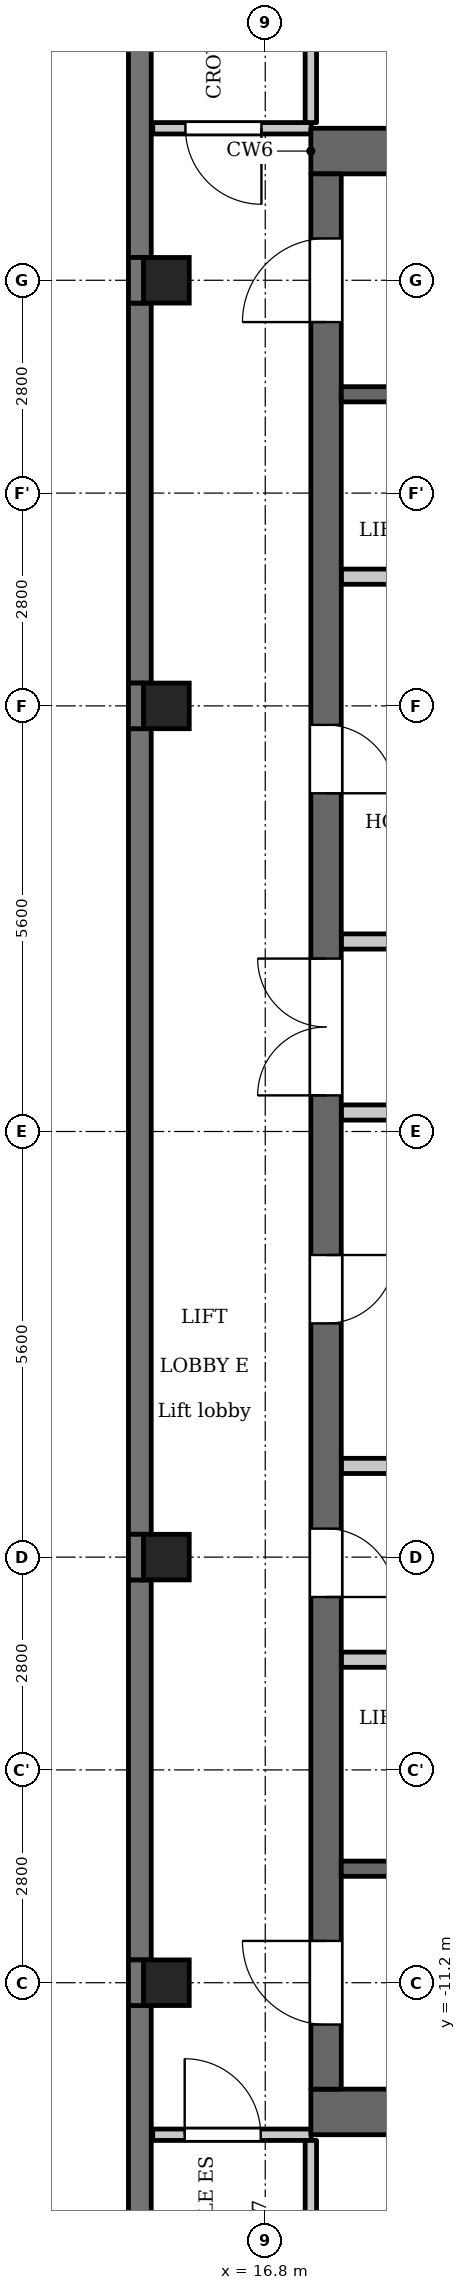
"""IFC4 building model, lengths in metres.
Left out: names, types, materials, properties, quantities, classifications, styles, units other than length and angle.
Written with IfcOpenShell. Run it as: python <this file> out.ifc"""

import sys

from ifc_helpers import new_model, si_unit, direction, frame, frame_2d, origin, origin_2d, place, context, subcontext, project, spatial, polyline, rectangle, outline, extrude, element, fill, save


model = new_model("IFC4")
c1 = context("Model", 3, precision=1e-05, world=origin(), true_north=direction((0.0, 1.0)))
c2 = subcontext(c1, "Body", "Model", "MODEL_VIEW")
j1 = project(units=[si_unit("LENGTHUNIT", "METRE"), si_unit("PLANEANGLEUNIT", "RADIAN")], contexts=[c1])
p1 = place(None, origin())
s1 = spatial("IfcSite", under=j1, at=p1, CompositionType="ELEMENT")
p2 = place(p1, origin())
s2 = spatial("IfcBuilding", under=s1, at=p2, CompositionType="ELEMENT")
p3 = place(p2, frame((0.0, 0.0, 310.4)))
s3 = spatial("IfcBuildingStorey", under=s2, at=p3, CompositionType="ELEMENT", Elevation=310.4)
for number, where, z_axis, x_axis in (
    (1, (15.5, -11.2, 0.0), (0.0, 0.0, 1.0), (1.0, 0.0, 0.0)),
    (2, (15.5, -5.6, 0.0), (0.0, 0.0, 1.0), (1.0, 0.0, 0.0)),
    (3, (15.5, 5.6, 0.0), (0.0, 0.0, 1.0), (1.0, 0.0, 0.0)),
    (4, (15.5, 11.2, 0.0), (0.0, 0.0, 1.0), (1.0, 0.0, 0.0)),
):
    element("IfcColumn", number, at=place(p3, frame(where, z_axis=z_axis, x_axis=x_axis)), inside=s3, PredefinedType="COLUMN", context=c2, shape_type="SweptSolid", body=[
        extrude(rectangle(XDim=0.6, YDim=0.6, at=origin_2d()), origin(), (0.0, 0.0, 1.0), 3.5),
    ])
p4 = place(p3, frame((15.15, 18.8, 0.0), z_axis=(0.0, 0.0, 1.0), x_axis=(0.0, -1.0, 0.0)))
e5 = element("IfcWall", 5, at=p4, inside=s3, PredefinedType="SOLIDWALL", context=c2, shape_type="SweptSolid", body=[
    extrude(rectangle(XDim=7.3, YDim=0.3, at=frame_2d((3.65, 0.0))), origin(), (0.0, 0.0, 1.0), 2.8),
])
p5 = place(p4, frame((1.462, 0.0, 0.9)))
e6 = element("IfcOpeningElement", 6, at=p5, cuts=e5, PredefinedType="OPENING", context=c2, shape_type="SweptSolid", body=[
    extrude(rectangle(XDim=2.6, YDim=1.25, at=frame_2d((1.3, 0.625))), frame((0.0, 0.16, 0.0), z_axis=(0.0, -1.0, 0.0), x_axis=(1.0, 0.0, 0.0)), (0.0, 0.0, 1.0), 0.32),
])
p6 = place(p3, frame((15.15, 10.9, 0.0), z_axis=(0.0, 0.0, 1.0), x_axis=(0.0, -1.0, 0.0)))
e7 = element("IfcWall", 7, at=p6, inside=s3, PredefinedType="SOLIDWALL", context=c2, shape_type="SweptSolid", body=[
    extrude(rectangle(XDim=5.0, YDim=0.3, at=frame_2d((2.5, 0.0))), origin(), (0.0, 0.0, 1.0), 2.8),
])
p7 = place(p3, frame((15.15, 5.3, 0.0), z_axis=(0.0, 0.0, 1.0), x_axis=(0.0, -1.0, 0.0)))
e8 = element("IfcWall", 8, at=p7, inside=s3, PredefinedType="SOLIDWALL", context=c2, shape_type="SweptSolid", body=[
    extrude(rectangle(XDim=10.6, YDim=0.3, at=frame_2d((5.3, 0.0))), origin(), (0.0, 0.0, 1.0), 2.8),
])
p8 = place(p3, frame((15.15, -5.9, 0.0), z_axis=(0.0, 0.0, 1.0), x_axis=(0.0, -1.0, 0.0)))
e9 = element("IfcWall", 9, at=p8, inside=s3, PredefinedType="SOLIDWALL", context=c2, shape_type="SweptSolid", body=[
    extrude(rectangle(XDim=5.0, YDim=0.3, at=frame_2d((2.5, 0.0))), origin(), (0.0, 0.0, 1.0), 2.8),
])
p9 = place(p3, frame((15.15, -11.5, 0.0), z_axis=(0.0, 0.0, 1.0), x_axis=(0.0, -1.0, 0.0)))
e10 = element("IfcWall", 10, at=p9, inside=s3, PredefinedType="SOLIDWALL", context=c2, shape_type="SweptSolid", body=[
    extrude(rectangle(XDim=7.3, YDim=0.3, at=frame_2d((3.65, 0.0))), origin(), (0.0, 0.0, 1.0), 2.8),
])
p10 = place(p9, frame((3.637, 0.0, 0.9)))
e11 = element("IfcOpeningElement", 11, at=p10, cuts=e10, PredefinedType="OPENING", context=c2, shape_type="SweptSolid", body=[
    extrude(rectangle(XDim=1.8, YDim=1.25, at=frame_2d((0.9, 0.625))), frame((0.0, 0.16, 0.0), z_axis=(0.0, -1.0, 0.0), x_axis=(1.0, 0.0, 0.0)), (0.0, 0.0, 1.0), 0.32),
])
for number, where, z_axis, x_axis in (
    (12, (17.4, 12.9, 0.0), (0.0, 0.0, 1.0), (1.0, 0.0, 0.0)),
    (13, (17.4, -12.9, 0.0), (0.0, 0.0, 1.0), (1.0, 0.0, 0.0)),
):
    element("IfcWall", number, at=place(p3, frame(where, z_axis=z_axis, x_axis=x_axis)), inside=s3, PredefinedType="SHEAR", context=c2, shape_type="SweptSolid", body=[
        extrude(rectangle(XDim=7.6, YDim=0.6, at=frame_2d((3.8, 0.0))), origin(), (0.0, 0.0, 1.0), 2.8),
    ])
p11 = place(p3, frame((17.8, -4.4, 0.0), z_axis=(0.0, 0.0, 1.0), x_axis=(1.0, 0.0, 0.0)))
e14 = element("IfcWall", 14, at=p11, inside=s3, PredefinedType="PARTITIONING", context=c2, shape_type="SweptSolid", body=[
    extrude(rectangle(XDim=2.8, YDim=0.2, at=frame_2d((1.4, 0.0))), origin(), (0.0, 0.0, 1.0), 2.8),
])
p12 = place(p3, frame((17.6, -12.6, 0.0), z_axis=(0.0, 0.0, 1.0), x_axis=(0.0, 1.0, 0.0)))
e15 = element("IfcWall", 15, at=p12, inside=s3, PredefinedType="SHEAR", context=c2, shape_type="SweptSolid", body=[
    extrude(rectangle(XDim=25.2, YDim=0.4, at=frame_2d((12.6, 0.0))), origin(), (0.0, 0.0, 1.0), 2.8),
])
p13 = place(p12, frame((6.475, 0.0, 0.0)))
e16 = element("IfcOpeningElement", 16, at=p13, cuts=e15, PredefinedType="OPENING", context=c2, shape_type="SweptSolid", body=[
    extrude(rectangle(XDim=0.9, YDim=2.1, at=frame_2d((0.45, 1.05))), frame((0.0, 0.21, 0.0), z_axis=(0.0, -1.0, 0.0), x_axis=(1.0, 0.0, 0.0)), (0.0, 0.0, 1.0), 0.42),
])
p14 = place(p12, frame((10.075, 0.0, 0.0)))
e17 = element("IfcOpeningElement", 17, at=p14, cuts=e15, PredefinedType="OPENING", context=c2, shape_type="SweptSolid", body=[
    extrude(rectangle(XDim=0.9, YDim=2.1, at=frame_2d((0.45, 1.05))), frame((0.0, 0.21, 0.0), z_axis=(0.0, -1.0, 0.0), x_axis=(1.0, 0.0, 0.0)), (0.0, 0.0, 1.0), 0.42),
])
p15 = place(p12, frame((17.05, 0.0, 0.0)))
e18 = element("IfcOpeningElement", 18, at=p15, cuts=e15, PredefinedType="OPENING", context=c2, shape_type="SweptSolid", body=[
    extrude(rectangle(XDim=0.9, YDim=2.1, at=frame_2d((0.45, 1.05))), frame((0.0, 0.21, 0.0), z_axis=(0.0, -1.0, 0.0), x_axis=(1.0, 0.0, 0.0)), (0.0, 0.0, 1.0), 0.42),
])
p16 = place(p12, frame((23.25, 0.0, 0.0)))
e19 = element("IfcOpeningElement", 19, at=p16, cuts=e15, PredefinedType="OPENING", context=c2, shape_type="SweptSolid", body=[
    extrude(rectangle(XDim=1.1, YDim=2.1, at=frame_2d((0.55, 1.05))), frame((0.0, 0.21, 0.0), z_axis=(0.0, -1.0, 0.0), x_axis=(1.0, 0.0, 0.0)), (0.0, 0.0, 1.0), 0.42),
])
p17 = place(p12, frame((0.85, 0.0, 0.0)))
e20 = element("IfcOpeningElement", 20, at=p17, cuts=e15, PredefinedType="OPENING", context=c2, shape_type="SweptSolid", body=[
    extrude(rectangle(XDim=1.1, YDim=2.1, at=frame_2d((0.55, 1.05))), frame((0.0, 0.21, 0.0), z_axis=(0.0, -1.0, 0.0), x_axis=(1.0, 0.0, 0.0)), (0.0, 0.0, 1.0), 0.42),
])
p18 = place(p12, frame((13.075, 0.0, 0.0)))
e21 = element("IfcOpeningElement", 21, at=p18, cuts=e15, PredefinedType="OPENING", context=c2, shape_type="SweptSolid", body=[
    extrude(rectangle(XDim=1.8, YDim=2.1, at=frame_2d((0.9, 1.05))), frame((0.0, 0.21, 0.0), z_axis=(0.0, -1.0, 0.0), x_axis=(1.0, 0.0, 0.0)), (0.0, 0.0, 1.0), 0.42),
])
p19 = place(p3, frame((17.8, -9.7, 0.0), z_axis=(0.0, 0.0, 1.0), x_axis=(1.0, 0.0, 0.0)))
e22 = element("IfcWall", 22, at=p19, inside=s3, PredefinedType="SHEAR", context=c2, shape_type="SweptSolid", body=[
    extrude(rectangle(XDim=5.8, YDim=0.2, at=frame_2d((2.9, 0.0))), origin(), (0.0, 0.0, 1.0), 2.8),
])
p20 = place(p19, frame((0.85, 0.0, 0.0)))
e23 = element("IfcOpeningElement", 23, at=p20, cuts=e22, PredefinedType="OPENING", context=c2, shape_type="SweptSolid", body=[
    extrude(rectangle(XDim=1.1, YDim=2.1, at=frame_2d((0.55, 1.05))), frame((0.0, 0.11, 0.0), z_axis=(0.0, -1.0, 0.0), x_axis=(1.0, 0.0, 0.0)), (0.0, 0.0, 1.0), 0.22),
])
p21 = place(p19, frame((3.75, 0.0, 0.0)))
e24 = element("IfcOpeningElement", 24, at=p21, cuts=e22, PredefinedType="OPENING", context=c2, shape_type="SweptSolid", body=[
    extrude(rectangle(XDim=1.1, YDim=2.1, at=frame_2d((0.55, 1.05))), frame((0.0, 0.11, 0.0), z_axis=(0.0, -1.0, 0.0), x_axis=(1.0, 0.0, 0.0)), (0.0, 0.0, 1.0), 0.22),
])
p22 = place(p3, frame((17.8, -6.95, 0.0), z_axis=(0.0, 0.0, 1.0), x_axis=(1.0, 0.0, 0.0)))
e25 = element("IfcWall", 25, at=p22, inside=s3, PredefinedType="PARTITIONING", context=c2, shape_type="SweptSolid", body=[
    extrude(rectangle(XDim=2.8, YDim=0.2, at=frame_2d((1.4, 0.0))), origin(), (0.0, 0.0, 1.0), 2.8),
])
for number, where, z_axis, x_axis in (
    (26, (17.8, 0.25, 0.0), (0.0, 0.0, 1.0), (1.0, 0.0, 0.0)),
    (27, (17.8, 2.5, 0.0), (0.0, 0.0, 1.0), (1.0, 0.0, 0.0)),
):
    element("IfcWall", number, at=place(p3, frame(where, z_axis=z_axis, x_axis=x_axis)), inside=s3, PredefinedType="PARTITIONING", context=c2, shape_type="SweptSolid", body=[
        extrude(rectangle(XDim=3.0, YDim=0.2, at=frame_2d((1.5, 0.0))), origin(), (0.0, 0.0, 1.0), 2.8),
    ])
p23 = place(p3, frame((17.8, 7.3, 0.0), z_axis=(0.0, 0.0, 1.0), x_axis=(1.0, 0.0, 0.0)))
e28 = element("IfcWall", 28, at=p23, inside=s3, PredefinedType="PARTITIONING", context=c2, shape_type="SweptSolid", body=[
    extrude(rectangle(XDim=2.8, YDim=0.2, at=frame_2d((1.4, 0.0))), origin(), (0.0, 0.0, 1.0), 2.8),
])
p24 = place(p3, frame((17.8, 9.7, 0.0), z_axis=(0.0, 0.0, 1.0), x_axis=(1.0, 0.0, 0.0)))
e29 = element("IfcWall", 29, at=p24, inside=s3, PredefinedType="SHEAR", context=c2, shape_type="SweptSolid", body=[
    extrude(rectangle(XDim=5.8, YDim=0.2, at=frame_2d((2.9, 0.0))), origin(), (0.0, 0.0, 1.0), 2.8),
])
p25 = place(p24, frame((0.85, 0.0, 0.0)))
e30 = element("IfcOpeningElement", 30, at=p25, cuts=e29, PredefinedType="OPENING", context=c2, shape_type="SweptSolid", body=[
    extrude(rectangle(XDim=1.1, YDim=2.1, at=frame_2d((0.55, 1.05))), frame((0.0, 0.11, 0.0), z_axis=(0.0, -1.0, 0.0), x_axis=(1.0, 0.0, 0.0)), (0.0, 0.0, 1.0), 0.22),
])
p26 = place(p24, frame((3.75, 0.0, 0.0)))
e31 = element("IfcOpeningElement", 31, at=p26, cuts=e29, PredefinedType="OPENING", context=c2, shape_type="SweptSolid", body=[
    extrude(rectangle(XDim=1.1, YDim=2.1, at=frame_2d((0.55, 1.05))), frame((0.0, 0.11, 0.0), z_axis=(0.0, -1.0, 0.0), x_axis=(1.0, 0.0, 0.0)), (0.0, 0.0, 1.0), 0.22),
])
p27 = place(p3, frame((15.32, -13.2, 0.0), z_axis=(0.0, 0.0, 1.0), x_axis=(1.0, 0.0, 0.0)))
e32 = element("IfcWall", 32, at=p27, inside=s3, PredefinedType="PARTITIONING", context=c2, shape_type="SweptSolid", body=[
    extrude(rectangle(XDim=2.085, YDim=0.15, at=frame_2d((1.042, 0.0))), origin(), (0.0, 0.0, 1.0), 2.8),
])
p28 = place(p27, frame((0.42, 0.0, 0.0)))
e33 = element("IfcOpeningElement", 33, at=p28, cuts=e32, PredefinedType="OPENING", context=c2, shape_type="SweptSolid", body=[
    extrude(rectangle(XDim=1.0, YDim=2.1, at=frame_2d((0.5, 1.05))), frame((0.0, 0.085, 0.0), z_axis=(0.0, -1.0, 0.0), x_axis=(1.0, 0.0, 0.0)), (0.0, 0.0, 1.0), 0.17),
])
p29 = place(p3, frame((15.32, 13.2, 0.0), z_axis=(0.0, 0.0, 1.0), x_axis=(1.0, 0.0, 0.0)))
e34 = element("IfcWall", 34, at=p29, inside=s3, PredefinedType="PARTITIONING", context=c2, shape_type="SweptSolid", body=[
    extrude(rectangle(XDim=2.085, YDim=0.15, at=frame_2d((1.042, 0.0))), origin(), (0.0, 0.0, 1.0), 2.8),
])
p30 = place(p29, frame((0.43, 0.0, 0.0)))
e35 = element("IfcOpeningElement", 35, at=p30, cuts=e34, PredefinedType="OPENING", context=c2, shape_type="SweptSolid", body=[
    extrude(rectangle(XDim=1.0, YDim=2.1, at=frame_2d((0.5, 1.05))), frame((0.0, 0.085, 0.0), z_axis=(0.0, -1.0, 0.0), x_axis=(1.0, 0.0, 0.0)), (0.0, 0.0, 1.0), 0.17),
])
p31 = place(p3, frame((17.4, -19.236, 0.0), z_axis=(0.0, 0.0, 1.0), x_axis=(0.0, 1.0, 0.0)))
e36 = element("IfcWall", 36, at=p31, inside=s3, PredefinedType="PARTITIONING", context=c2, shape_type="SweptSolid", body=[
    extrude(rectangle(XDim=5.961, YDim=0.15, at=frame_2d((2.981, 0.0))), origin(), (0.0, 0.0, 1.0), 2.8),
])
p32 = place(p31, frame((3.917, 0.0, 0.0)))
e37 = element("IfcOpeningElement", 37, at=p32, cuts=e36, PredefinedType="OPENING", context=c2, shape_type="SweptSolid", body=[
    extrude(rectangle(XDim=0.9, YDim=2.1, at=frame_2d((0.45, 1.05))), frame((0.0, 0.085, 0.0), z_axis=(0.0, -1.0, 0.0), x_axis=(1.0, 0.0, 0.0)), (0.0, 0.0, 1.0), 0.17),
])
p33 = place(p3, frame((17.4, 13.275, 0.0), z_axis=(0.0, 0.0, 1.0), x_axis=(0.0, 1.0, 0.0)))
e38 = element("IfcWall", 38, at=p33, inside=s3, PredefinedType="PARTITIONING", context=c2, shape_type="SweptSolid", body=[
    extrude(rectangle(XDim=5.961, YDim=0.15, at=frame_2d((2.981, 0.0))), origin(), (0.0, 0.0, 1.0), 2.8),
])
p34 = place(p33, frame((4.575, 0.0, 0.0)))
e39 = element("IfcOpeningElement", 39, at=p34, cuts=e38, PredefinedType="OPENING", context=c2, shape_type="SweptSolid", body=[
    extrude(rectangle(XDim=1.0, YDim=2.1, at=frame_2d((0.5, 1.05))), frame((0.0, 0.085, 0.0), z_axis=(0.0, -1.0, 0.0), x_axis=(1.0, 0.0, 0.0)), (0.0, 0.0, 1.0), 0.17),
])
p35 = place(p3, origin())
e40 = element("IfcWall", 40, at=p35, inside=s3, PredefinedType="SOLIDWALL", context=c2, shape_type="SweptSolid", body=[
    extrude(outline(polyline([(15.2, -10.9), (15.0, -10.9), (15.0, -11.5), (15.2, -11.5), (15.2, -10.9)])), origin(), (0.0, 0.0, 1.0), 2.8),
])
e41 = element("IfcWall", 41, at=p35, inside=s3, PredefinedType="SOLIDWALL", context=c2, shape_type="SweptSolid", body=[
    extrude(outline(polyline([(15.2, -5.3), (15.0, -5.3), (15.0, -5.9), (15.3, -5.9), (15.2, -5.9), (15.2, -5.3)])), origin(), (0.0, 0.0, 1.0), 2.8),
])
e42 = element("IfcWall", 42, at=p35, inside=s3, PredefinedType="SOLIDWALL", context=c2, shape_type="SweptSolid", body=[
    extrude(outline(polyline([(15.3, 5.9), (15.0, 5.9), (15.0, 5.3), (15.3, 5.3), (15.2, 5.3), (15.2, 5.9), (15.3, 5.9)])), origin(), (0.0, 0.0, 1.0), 2.8),
])
e43 = element("IfcWall", 43, at=p35, inside=s3, PredefinedType="SOLIDWALL", context=c2, shape_type="SweptSolid", body=[
    extrude(outline(polyline([(15.2, 11.5), (15.0, 11.5), (15.0, 10.9), (15.2, 10.9), (15.2, 11.5)])), origin(), (0.0, 0.0, 1.0), 2.8),
])
p36 = place(p13, origin())
e44 = element("IfcDoor", 44, at=p36, inside=s3, OperationType="SINGLE_SWING_LEFT", PredefinedType="DOOR", context=c2, shape_type="SweptSolid", body=[
    extrude(rectangle(XDim=0.9, YDim=2.1, at=frame_2d((0.45, 1.05))), frame((0.0, 0.025, 0.0), z_axis=(0.0, -1.0, 0.0), x_axis=(1.0, 0.0, 0.0)), (0.0, 0.0, 1.0), 0.05),
])
fill(e16, e44)
p37 = place(p14, origin())
e45 = element("IfcDoor", 45, at=p37, inside=s3, OperationType="SINGLE_SWING_RIGHT", PredefinedType="DOOR", context=c2, shape_type="SweptSolid", body=[
    extrude(rectangle(XDim=0.9, YDim=2.1, at=frame_2d((0.45, 1.05))), frame((0.0, 0.025, 0.0), z_axis=(0.0, -1.0, 0.0), x_axis=(1.0, 0.0, 0.0)), (0.0, 0.0, 1.0), 0.05),
])
fill(e17, e45)
p38 = place(p15, origin())
e46 = element("IfcDoor", 46, at=p38, inside=s3, OperationType="SINGLE_SWING_LEFT", PredefinedType="DOOR", context=c2, shape_type="SweptSolid", body=[
    extrude(rectangle(XDim=0.9, YDim=2.1, at=frame_2d((0.45, 1.05))), frame((0.0, 0.025, 0.0), z_axis=(0.0, -1.0, 0.0), x_axis=(1.0, 0.0, 0.0)), (0.0, 0.0, 1.0), 0.05),
])
fill(e18, e46)
p39 = place(p16, origin())
e47 = element("IfcDoor", 47, at=p39, inside=s3, OperationType="SINGLE_SWING_RIGHT", PredefinedType="DOOR", context=c2, shape_type="SweptSolid", body=[
    extrude(rectangle(XDim=1.1, YDim=2.1, at=frame_2d((0.55, 1.05))), frame((0.0, 0.025, 0.0), z_axis=(0.0, -1.0, 0.0), x_axis=(1.0, 0.0, 0.0)), (0.0, 0.0, 1.0), 0.05),
])
fill(e19, e47)
p40 = place(p17, origin())
e48 = element("IfcDoor", 48, at=p40, inside=s3, OperationType="SINGLE_SWING_LEFT", PredefinedType="DOOR", context=c2, shape_type="SweptSolid", body=[
    extrude(rectangle(XDim=1.1, YDim=2.1, at=frame_2d((0.55, 1.05))), frame((0.0, 0.025, 0.0), z_axis=(0.0, -1.0, 0.0), x_axis=(1.0, 0.0, 0.0)), (0.0, 0.0, 1.0), 0.05),
])
fill(e20, e48)
p41 = place(p18, origin())
e49 = element("IfcDoor", 49, at=p41, inside=s3, OperationType="DOUBLE_DOOR_SINGLE_SWING", PredefinedType="DOOR", context=c2, shape_type="SweptSolid", body=[
    extrude(rectangle(XDim=1.8, YDim=2.1, at=frame_2d((0.9, 1.05))), frame((0.0, 0.025, 0.0), z_axis=(0.0, -1.0, 0.0), x_axis=(1.0, 0.0, 0.0)), (0.0, 0.0, 1.0), 0.05),
])
fill(e21, e49)
p42 = place(p30, origin())
e50 = element("IfcDoor", 50, at=p42, inside=s3, OperationType="SINGLE_SWING_RIGHT", PredefinedType="DOOR", context=c2, shape_type="SweptSolid", body=[
    extrude(rectangle(XDim=1.0, YDim=2.1, at=frame_2d((0.5, 1.05))), frame((0.0, 0.025, 0.0), z_axis=(0.0, -1.0, 0.0), x_axis=(1.0, 0.0, 0.0)), (0.0, 0.0, 1.0), 0.05),
])
fill(e35, e50)
p43 = place(p28, origin())
e51 = element("IfcDoor", 51, at=p43, inside=s3, OperationType="SINGLE_SWING_RIGHT", PredefinedType="DOOR", context=c2, shape_type="SweptSolid", body=[
    extrude(rectangle(XDim=1.0, YDim=2.1, at=frame_2d((0.5, 1.05))), frame((0.0, 0.025, 0.0), z_axis=(0.0, -1.0, 0.0), x_axis=(1.0, 0.0, 0.0)), (0.0, 0.0, 1.0), 0.05),
])
fill(e33, e51)
save(model, sys.argv[1])
